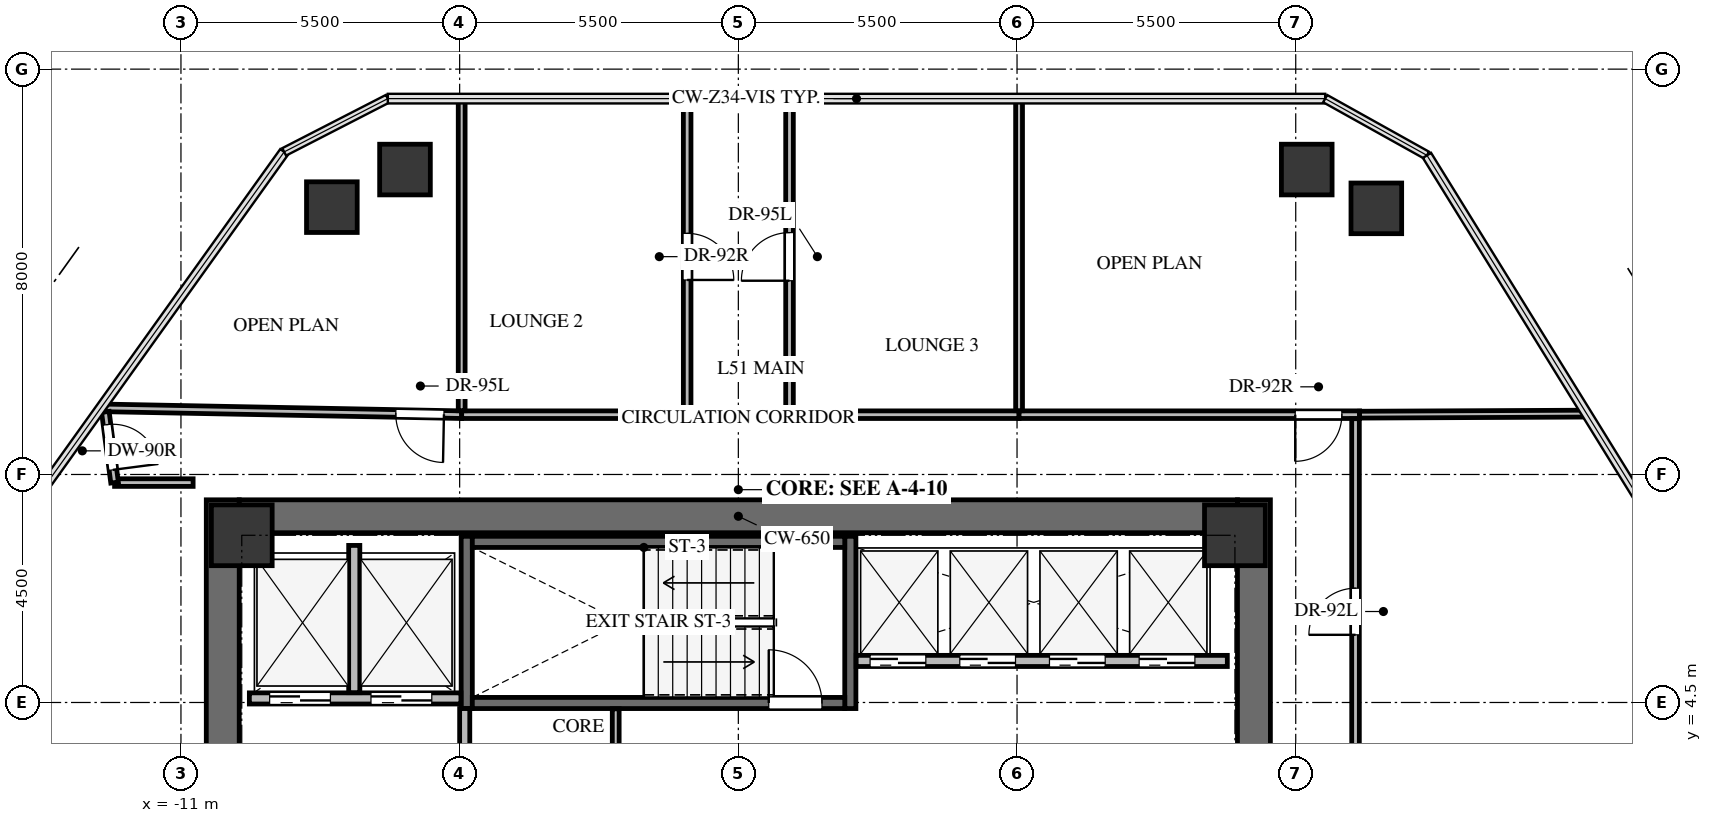
"""IFC4 building model, lengths in metres.
Left out: names, types, materials, properties, quantities, classifications, styles, units other than length and angle.
Written with IfcOpenShell. Run it as: python <this file> out.ifc"""

import sys

from ifc_helpers import new_model, si_unit, direction, frame, frame_2d, origin, origin_2d, place, context, subcontext, project, spatial, rectangle, extrude, source, transform, mapped, element, fill, save


model = new_model("IFC4")
c1 = context("Model", 3, precision=1e-05, world=origin(), true_north=direction((0.0, 1.0)))
c2 = subcontext(c1, "Body", "Model", "MODEL_VIEW")
j1 = project(units=[si_unit("LENGTHUNIT", "METRE"), si_unit("PLANEANGLEUNIT", "RADIAN")], contexts=[c1])
p1 = place(None, origin())
s1 = spatial("IfcSite", under=j1, at=p1, CompositionType="ELEMENT")
p2 = place(p1, origin())
s2 = spatial("IfcBuilding", under=s1, at=p2, CompositionType="ELEMENT")
p3 = place(p2, frame((0.0, 0.0, 187.0)))
s3 = spatial("IfcBuildingStorey", under=s2, at=p3, CompositionType="ELEMENT", Elevation=187.0)
for number, where, z_axis, x_axis in (
    (1, (-10.175, -8.5, 0.0), (0.0, 0.0, 1.0), (0.0, 1.0, 0.0)),
    (2, (10.175, -8.5, 0.0), (0.0, 0.0, 1.0), (0.0, 1.0, 0.0)),
):
    element("IfcWall", number, at=place(p3, frame(where, z_axis=z_axis, x_axis=x_axis)), inside=s3, PredefinedType="SHEAR", context=c2, shape_type="SweptSolid", body=[
        extrude(rectangle(XDim=17.0, YDim=0.65, at=frame_2d((8.5, 0.0))), origin(), (0.0, 0.0, 1.0), 3.3),
    ])
p4 = place(p3, frame((-9.85, 8.175, 0.0), z_axis=(0.0, 0.0, 1.0), x_axis=(1.0, 0.0, 0.0)))
e3 = element("IfcWall", 3, at=p4, inside=s3, PredefinedType="SHEAR", context=c2, shape_type="SweptSolid", body=[
    extrude(rectangle(XDim=19.7, YDim=0.65, at=frame_2d((9.85, 0.0))), origin(), (0.0, 0.0, 1.0), 3.3),
])
for number, where, z_axis, x_axis in (
    (4, (2.21, 4.38, -0.24), (0.0, 0.0, 1.0), (0.0, 1.0, 0.0)),
    (5, (-5.36, 7.78, -0.24), (0.0, 0.0, 1.0), (0.0, -1.0, 0.0)),
):
    element("IfcWall", number, at=place(p3, frame(where, z_axis=z_axis, x_axis=x_axis)), inside=s3, PredefinedType="SHEAR", context=c2, shape_type="SweptSolid", body=[
        extrude(rectangle(XDim=3.4, YDim=0.22, at=frame_2d((1.7, 0.0))), origin(), (0.0, 0.0, 1.0), 3.3),
    ])
p5 = place(p3, frame((-5.25, 4.49, -0.24), z_axis=(0.0, 0.0, 1.0), x_axis=(1.0, 0.0, 0.0)))
e6 = element("IfcWall", 6, at=p5, inside=s3, PredefinedType="SHEAR", context=c2, shape_type="SweptSolid", body=[
    extrude(rectangle(XDim=7.35, YDim=0.22, at=frame_2d((3.675, 0.0))), origin(), (0.0, 0.0, 1.0), 3.3),
])
p6 = place(p5, frame((5.85, 0.0, 0.0)))
e7 = element("IfcOpeningElement", 7, at=p6, cuts=e6, PredefinedType="OPENING", context=c2, shape_type="SweptSolid", body=[
    extrude(rectangle(XDim=1.05, YDim=2.15, at=frame_2d((0.525, 1.075))), frame((0.0, 0.12, 0.0), z_axis=(0.0, -1.0, 0.0), x_axis=(1.0, 0.0, 0.0)), (0.0, 0.0, 1.0), 0.24),
])
p7 = place(p3, frame((2.1, 7.67, -0.24), z_axis=(0.0, 0.0, 1.0), x_axis=(-1.0, 0.0, 0.0)))
e8 = element("IfcWall", 8, at=p7, inside=s3, PredefinedType="SHEAR", context=c2, shape_type="SweptSolid", body=[
    extrude(rectangle(XDim=7.35, YDim=0.22, at=frame_2d((3.675, 0.0))), origin(), (0.0, 0.0, 1.0), 3.3),
])
m1 = source(origin(), c2, "Body", "SweptSolid", [
    extrude(rectangle(XDim=1.2, YDim=1.2, at=origin_2d()), origin(), (0.0, 0.0, 1.0), 3.3),
])
for number, where, z_axis, x_axis in (
    (9, (9.8, 7.8, -0.24), (0.0, 0.0, 1.0), (1.0, 0.0, 0.0)),
    (10, (-9.8, 7.8, -0.24), (0.0, 0.0, 1.0), (1.0, 0.0, 0.0)),
):
    element("IfcColumn", number, at=place(p3, frame(where, z_axis=z_axis, x_axis=x_axis)), inside=s3, PredefinedType="COLUMN", context=c2, shape_type="MappedRepresentation", body=[
        mapped(m1, transform((0.0, 0.0, 0.0), x_axis=(1.0, 0.0, 0.0), y_axis=(0.0, 1.0, 0.0), z_axis=(0.0, 0.0, 1.0), scale=1.0)),
    ])
m2 = source(origin(), c2, "Body", "SweptSolid", [
    extrude(rectangle(XDim=1.0, YDim=1.0, at=origin_2d()), origin(), (0.0, 0.0, 1.0), 3.3),
])
for number, where, z_axis, x_axis in (
    (11, (-8.022, 14.276, -0.24), (0.0, 0.0, 1.0), (1.0, 0.0, 0.0)),
    (12, (-6.579, 15.018, -0.24), (0.0, 0.0, 1.0), (1.0, 0.0, 0.0)),
    (13, (11.218, 15.018, -0.24), (0.0, 0.0, 1.0), (1.0, 0.0, 0.0)),
    (14, (12.591, 14.252, -0.24), (0.0, 0.0, 1.0), (1.0, 0.0, 0.0)),
):
    element("IfcColumn", number, at=place(p3, frame(where, z_axis=z_axis, x_axis=x_axis)), inside=s3, PredefinedType="COLUMN", context=c2, shape_type="MappedRepresentation", body=[
        mapped(m2, transform((0.0, 0.0, 0.0), x_axis=(1.0, 0.0, 0.0), y_axis=(0.0, 1.0, 0.0), z_axis=(0.0, 0.0, 1.0), scale=1.0)),
    ])
p8 = place(p3, frame((-9.65, 4.58, 0.0), z_axis=(0.0, 0.0, 1.0), x_axis=(1.0, 0.0, 0.0)))
e15 = element("IfcWall", 15, at=p8, inside=s3, PredefinedType="SOLIDWALL", context=c2, shape_type="SweptSolid", body=[
    extrude(rectangle(XDim=4.175, YDim=0.22, at=frame_2d((2.087, 0.0))), origin(), (0.0, 0.0, 1.0), 3.045),
])
p9 = place(p8, frame((0.4, 0.0, 0.0)))
e16 = element("IfcOpeningElement", 16, at=p9, cuts=e15, PredefinedType="OPENING", context=c2, shape_type="SweptSolid", body=[
    extrude(rectangle(XDim=1.2, YDim=2.15, at=frame_2d((0.6, 1.075))), frame((0.0, 0.12, 0.0), z_axis=(0.0, -1.0, 0.0), x_axis=(1.0, 0.0, 0.0)), (0.0, 0.0, 1.0), 0.24),
])
p10 = place(p8, frame((2.4, 0.0, 0.0)))
e17 = element("IfcOpeningElement", 17, at=p10, cuts=e15, PredefinedType="OPENING", context=c2, shape_type="SweptSolid", body=[
    extrude(rectangle(XDim=1.2, YDim=2.15, at=frame_2d((0.6, 1.075))), frame((0.0, 0.12, 0.0), z_axis=(0.0, -1.0, 0.0), x_axis=(1.0, 0.0, 0.0)), (0.0, 0.0, 1.0), 0.24),
])
p11 = place(p3, frame((-7.58, 4.694, 0.0), z_axis=(0.0, 0.0, 1.0), x_axis=(0.0, 1.0, 0.0)))
e18 = element("IfcWall", 18, at=p11, inside=s3, PredefinedType="SOLIDWALL", context=c2, shape_type="SweptSolid", body=[
    extrude(rectangle(XDim=2.906, YDim=0.22, at=frame_2d((1.453, 0.0))), origin(), (0.0, 0.0, 1.0), 3.045),
])
p12 = place(p3, frame((-5.4, 0.354, 0.0), z_axis=(0.0, 0.0, 1.0), x_axis=(0.0, 1.0, 0.0)))
e19 = element("IfcWall", 19, at=p12, inside=s3, PredefinedType="SOLIDWALL", context=c2, shape_type="SweptSolid", body=[
    extrude(rectangle(XDim=4.026, YDim=0.2, at=frame_2d((2.013, 0.0))), origin(), (0.0, 0.0, 1.0), 3.045),
])
p13 = place(p12, frame((0.246, 0.0, 0.0)))
e20 = element("IfcOpeningElement", 20, at=p13, cuts=e19, PredefinedType="OPENING", context=c2, shape_type="SweptSolid", body=[
    extrude(rectangle(XDim=1.0, YDim=2.15, at=frame_2d((0.5, 1.075))), frame((0.0, 0.11, 0.0), z_axis=(0.0, -1.0, 0.0), x_axis=(1.0, 0.0, 0.0)), (0.0, 0.0, 1.0), 0.22),
])
p14 = place(p3, frame((2.325, 5.32, 0.0), z_axis=(0.0, 0.0, 1.0), x_axis=(1.0, 0.0, 0.0)))
e21 = element("IfcWall", 21, at=p14, inside=s3, PredefinedType="SOLIDWALL", context=c2, shape_type="SweptSolid", body=[
    extrude(rectangle(XDim=7.325, YDim=0.22, at=frame_2d((3.663, 0.0))), origin(), (0.0, 0.0, 1.0), 3.045),
])
p15 = place(p14, frame((0.275, 0.0, 0.0)))
e22 = element("IfcOpeningElement", 22, at=p15, cuts=e21, PredefinedType="OPENING", context=c2, shape_type="SweptSolid", body=[
    extrude(rectangle(XDim=1.1, YDim=2.15, at=frame_2d((0.55, 1.075))), frame((0.0, 0.12, 0.0), z_axis=(0.0, -1.0, 0.0), x_axis=(1.0, 0.0, 0.0)), (0.0, 0.0, 1.0), 0.24),
])
p16 = place(p14, frame((2.045, 0.0, 0.0)))
e23 = element("IfcOpeningElement", 23, at=p16, cuts=e21, PredefinedType="OPENING", context=c2, shape_type="SweptSolid", body=[
    extrude(rectangle(XDim=1.1, YDim=2.15, at=frame_2d((0.55, 1.075))), frame((0.0, 0.12, 0.0), z_axis=(0.0, -1.0, 0.0), x_axis=(1.0, 0.0, 0.0)), (0.0, 0.0, 1.0), 0.24),
])
p17 = place(p14, frame((3.815, 0.0, 0.0)))
e24 = element("IfcOpeningElement", 24, at=p17, cuts=e21, PredefinedType="OPENING", context=c2, shape_type="SweptSolid", body=[
    extrude(rectangle(XDim=1.1, YDim=2.15, at=frame_2d((0.55, 1.075))), frame((0.0, 0.12, 0.0), z_axis=(0.0, -1.0, 0.0), x_axis=(1.0, 0.0, 0.0)), (0.0, 0.0, 1.0), 0.24),
])
p18 = place(p14, frame((5.585, 0.0, 0.0)))
e25 = element("IfcOpeningElement", 25, at=p18, cuts=e21, PredefinedType="OPENING", context=c2, shape_type="SweptSolid", body=[
    extrude(rectangle(XDim=1.1, YDim=2.15, at=frame_2d((0.55, 1.075))), frame((0.0, 0.12, 0.0), z_axis=(0.0, -1.0, 0.0), x_axis=(1.0, 0.0, 0.0)), (0.0, 0.0, 1.0), 0.24),
])
p19 = place(p3, frame((-5.46, 10.18, 0.0), z_axis=(0.0, 0.0, 1.0), x_axis=(-0.99981828266, 0.019063096779, 0.0)))
e26 = element("IfcWall", 26, at=p19, inside=s3, PredefinedType="PARTITIONING", context=c2, shape_type="SweptSolid", body=[
    extrude(rectangle(XDim=7.121, YDim=0.15, at=frame_2d((3.56, 0.0))), origin(), (0.0, 0.0, 1.0), 2.242),
])
p20 = place(p19, frame((0.35, 0.0, 0.0)))
e27 = element("IfcOpeningElement", 27, at=p20, cuts=e26, PredefinedType="OPENING", context=c2, shape_type="SweptSolid", body=[
    extrude(rectangle(XDim=0.95, YDim=2.1, at=frame_2d((0.475, 1.05))), frame((0.0, 0.085, 0.0), z_axis=(0.0, -1.0, 0.0), x_axis=(1.0, 0.0, 0.0)), (0.0, 0.0, 1.0), 0.17),
])
p21 = place(p3, frame((-1.01, 16.418, 0.0), z_axis=(0.0, 0.0, 1.0), x_axis=(0.0, -1.0, 0.0)))
e28 = element("IfcWall", 28, at=p21, inside=s3, PredefinedType="PARTITIONING", context=c2, shape_type="SweptSolid", body=[
    extrude(rectangle(XDim=6.238, YDim=0.15, at=frame_2d((3.119, 0.0))), origin(), (0.0, 0.0, 1.0), 2.399),
])
p22 = place(p21, frame((2.659, 0.0, 0.0)))
e29 = element("IfcOpeningElement", 29, at=p22, cuts=e28, PredefinedType="OPENING", context=c2, shape_type="SweptSolid", body=[
    extrude(rectangle(XDim=0.92, YDim=2.1, at=frame_2d((0.46, 1.05))), frame((0.0, 0.085, 0.0), z_axis=(0.0, -1.0, 0.0), x_axis=(1.0, 0.0, 0.0)), (0.0, 0.0, 1.0), 0.17),
])
p23 = place(p3, frame((-1.089, 10.18, 0.0), z_axis=(0.0, 0.0, 1.0), x_axis=(-1.0, 0.0, 0.0)))
e30 = element("IfcWall", 30, at=p23, inside=s3, PredefinedType="PARTITIONING", context=c2, shape_type="SweptSolid", body=[
    extrude(rectangle(XDim=4.371, YDim=0.15, at=frame_2d((2.186, 0.0))), origin(), (0.0, 0.0, 1.0), 2.608),
])
p24 = place(p3, frame((1.01, 10.18, 0.0), z_axis=(0.0, 0.0, 1.0), x_axis=(0.0, 1.0, 0.0)))
e31 = element("IfcWall", 31, at=p24, inside=s3, PredefinedType="PARTITIONING", context=c2, shape_type="SweptSolid", body=[
    extrude(rectangle(XDim=6.238, YDim=0.15, at=frame_2d((3.119, 0.0))), origin(), (0.0, 0.0, 1.0), 2.399),
])
p25 = place(p24, frame((2.644, 0.0, 0.0)))
e32 = element("IfcOpeningElement", 32, at=p25, cuts=e31, PredefinedType="OPENING", context=c2, shape_type="SweptSolid", body=[
    extrude(rectangle(XDim=0.95, YDim=2.1, at=frame_2d((0.475, 1.05))), frame((0.0, 0.085, 0.0), z_axis=(0.0, -1.0, 0.0), x_axis=(1.0, 0.0, 0.0)), (0.0, 0.0, 1.0), 0.17),
])
p26 = place(p3, frame((5.54, 10.18, 0.0), z_axis=(0.0, 0.0, 1.0), x_axis=(-1.0, 0.0, 0.0)))
e33 = element("IfcWall", 33, at=p26, inside=s3, PredefinedType="PARTITIONING", context=c2, shape_type="SweptSolid", body=[
    extrude(rectangle(XDim=4.451, YDim=0.15, at=frame_2d((2.226, 0.0))), origin(), (0.0, 0.0, 1.0), 2.608),
])
p27 = place(p3, frame((12.26, 10.18, 0.0), z_axis=(0.0, 0.0, 1.0), x_axis=(-1.0, 0.0, 0.0)))
e34 = element("IfcWall", 34, at=p27, inside=s3, PredefinedType="PARTITIONING", context=c2, shape_type="SweptSolid", body=[
    extrude(rectangle(XDim=6.72, YDim=0.15, at=frame_2d((3.36, 0.0))), origin(), (0.0, 0.0, 1.0), 2.242),
])
p28 = place(p27, frame((0.35, 0.0, 0.0)))
e35 = element("IfcOpeningElement", 35, at=p28, cuts=e34, PredefinedType="OPENING", context=c2, shape_type="SweptSolid", body=[
    extrude(rectangle(XDim=0.92, YDim=2.1, at=frame_2d((0.46, 1.05))), frame((0.0, 0.085, 0.0), z_axis=(0.0, -1.0, 0.0), x_axis=(1.0, 0.0, 0.0)), (0.0, 0.0, 1.0), 0.17),
])
p29 = place(p3, frame((-12.31, 8.84, 0.0), z_axis=(0.0, 0.0, 1.0), x_axis=(1.0, 0.0, 0.0)))
e36 = element("IfcWall", 36, at=p29, inside=s3, PredefinedType="PARTITIONING", context=c2, shape_type="SweptSolid", body=[
    extrude(rectangle(XDim=1.55, YDim=0.15, at=frame_2d((0.775, 0.0))), origin(), (0.0, 0.0, 1.0), 2.399),
])
p30 = place(p3, frame((-12.492, 10.235, 0.0), z_axis=(0.0, 0.0, 1.0), x_axis=(0.129309502928, -0.991604282187, 0.0)))
e37 = element("IfcWall", 37, at=p30, inside=s3, PredefinedType="PARTITIONING", context=c2, shape_type="SweptSolid", body=[
    extrude(rectangle(XDim=1.406, YDim=0.15, at=frame_2d((0.703, 0.0))), origin(), (0.0, 0.0, 1.0), 3.045),
])
p31 = place(p30, frame((0.253, 0.0, 0.0)))
e38 = element("IfcOpeningElement", 38, at=p31, cuts=e37, PredefinedType="OPENING", context=c2, shape_type="SweptSolid", body=[
    extrude(rectangle(XDim=0.9, YDim=2.05, at=frame_2d((0.45, 1.025))), frame((0.0, 0.085, 0.0), z_axis=(0.0, -1.0, 0.0), x_axis=(1.0, 0.0, 0.0)), (0.0, 0.0, 1.0), 0.17),
])
p32 = place(p3, frame((12.18, 2.49, 0.0), z_axis=(0.0, 0.0, 1.0), x_axis=(0.0, 1.0, 0.0)))
e39 = element("IfcWall", 39, at=p32, inside=s3, PredefinedType="PARTITIONING", context=c2, shape_type="SweptSolid", body=[
    extrude(rectangle(XDim=7.611, YDim=0.15, at=frame_2d((3.806, 0.0))), origin(), (0.0, 0.0, 1.0), 3.045),
])
p33 = place(p32, frame((3.345, 0.0, 0.0)))
e40 = element("IfcOpeningElement", 40, at=p33, cuts=e39, PredefinedType="OPENING", context=c2, shape_type="SweptSolid", body=[
    extrude(rectangle(XDim=0.92, YDim=2.1, at=frame_2d((0.46, 1.05))), frame((0.0, 0.085, 0.0), z_axis=(0.0, -1.0, 0.0), x_axis=(1.0, 0.0, 0.0)), (0.0, 0.0, 1.0), 0.17),
])
p34 = place(p3, frame((-2.42, 4.375, 0.0), z_axis=(0.0, 0.0, 1.0), x_axis=(0.0, -1.0, 0.0)))
e41 = element("IfcWall", 41, at=p34, inside=s3, PredefinedType="PARTITIONING", context=c2, shape_type="SweptSolid", body=[
    extrude(rectangle(XDim=2.586, YDim=0.135, at=frame_2d((1.293, 0.0))), origin(), (0.0, 0.0, 1.0), 3.045),
])
for number, where, z_axis, x_axis in (
    (42, (-5.46, 16.418, 0.0), (0.0, 0.0, 1.0), (0.0, -1.0, 0.0)),
    (43, (5.54, 16.418, 0.0), (0.0, 0.0, 1.0), (0.0, -1.0, 0.0)),
):
    element("IfcWall", number, at=place(p3, frame(where, z_axis=z_axis, x_axis=x_axis)), inside=s3, PredefinedType="PARTITIONING", context=c2, shape_type="SweptSolid", body=[
        extrude(rectangle(XDim=6.159, YDim=0.135, at=frame_2d((3.08, 0.0))), origin(), (0.0, 0.0, 1.0), 2.399),
    ])
p35 = place(p3, frame((16.74, 10.201, 0.0), z_axis=(0.0, 0.0, 1.0), x_axis=(-0.999989522694, -0.004577608714, 0.0)))
e44 = element("IfcWall", 44, at=p35, inside=s3, PredefinedType="PARTITIONING", context=c2, shape_type="SweptSolid", body=[
    extrude(rectangle(XDim=4.48, YDim=0.135, at=frame_2d((2.24, 0.0))), origin(), (0.0, 0.0, 1.0), 2.399),
])
m3 = source(origin(), c2, "Body", "SweptSolid", [
    extrude(rectangle(XDim=1.05, YDim=2.15, at=frame_2d((0.525, 1.075))), frame((0.0, 0.025, 0.0), z_axis=(0.0, -1.0, 0.0), x_axis=(1.0, 0.0, 0.0)), (0.0, 0.0, 1.0), 0.05),
])
p36 = place(p6, origin())
e45 = element("IfcDoor", 45, at=p36, inside=s3, OperationType="SINGLE_SWING_LEFT", PredefinedType="DOOR", context=c2, shape_type="MappedRepresentation", body=[
    mapped(m3, transform((0.0, 0.0, 0.0), x_axis=(1.0, 0.0, 0.0), y_axis=(0.0, 1.0, 0.0), z_axis=(0.0, 0.0, 1.0), scale=1.0)),
])
fill(e7, e45)
m4 = source(origin(), c2, "Body", "SweptSolid", [
    extrude(rectangle(XDim=1.2, YDim=2.15, at=frame_2d((0.6, 1.075))), frame((0.0, 0.025, 0.0), z_axis=(0.0, -1.0, 0.0), x_axis=(1.0, 0.0, 0.0)), (0.0, 0.0, 1.0), 0.05),
])
p37 = place(p9, origin())
e46 = element("IfcDoor", 46, at=p37, inside=s3, OperationType="DOUBLE_DOOR_SLIDING", PredefinedType="DOOR", context=c2, shape_type="MappedRepresentation", body=[
    mapped(m4, transform((0.0, 0.0, 0.0), x_axis=(1.0, 0.0, 0.0), y_axis=(0.0, 1.0, 0.0), z_axis=(0.0, 0.0, 1.0), scale=1.0)),
])
fill(e16, e46)
p38 = place(p10, origin())
e47 = element("IfcDoor", 47, at=p38, inside=s3, OperationType="DOUBLE_DOOR_SLIDING", PredefinedType="DOOR", context=c2, shape_type="MappedRepresentation", body=[
    mapped(m4, transform((0.0, 0.0, 0.0), x_axis=(1.0, 0.0, 0.0), y_axis=(0.0, 1.0, 0.0), z_axis=(0.0, 0.0, 1.0), scale=1.0)),
])
fill(e17, e47)
m5 = source(origin(), c2, "Body", "SweptSolid", [
    extrude(rectangle(XDim=1.1, YDim=2.15, at=frame_2d((0.55, 1.075))), frame((0.0, 0.025, 0.0), z_axis=(0.0, -1.0, 0.0), x_axis=(1.0, 0.0, 0.0)), (0.0, 0.0, 1.0), 0.05),
])
p39 = place(p15, origin())
e48 = element("IfcDoor", 48, at=p39, inside=s3, OperationType="DOUBLE_DOOR_SLIDING", PredefinedType="DOOR", context=c2, shape_type="MappedRepresentation", body=[
    mapped(m5, transform((0.0, 0.0, 0.0), x_axis=(1.0, 0.0, 0.0), y_axis=(0.0, 1.0, 0.0), z_axis=(0.0, 0.0, 1.0), scale=1.0)),
])
fill(e22, e48)
p40 = place(p16, origin())
e49 = element("IfcDoor", 49, at=p40, inside=s3, OperationType="DOUBLE_DOOR_SLIDING", PredefinedType="DOOR", context=c2, shape_type="MappedRepresentation", body=[
    mapped(m5, transform((0.0, 0.0, 0.0), x_axis=(1.0, 0.0, 0.0), y_axis=(0.0, 1.0, 0.0), z_axis=(0.0, 0.0, 1.0), scale=1.0)),
])
fill(e23, e49)
p41 = place(p17, origin())
e50 = element("IfcDoor", 50, at=p41, inside=s3, OperationType="DOUBLE_DOOR_SLIDING", PredefinedType="DOOR", context=c2, shape_type="MappedRepresentation", body=[
    mapped(m5, transform((0.0, 0.0, 0.0), x_axis=(1.0, 0.0, 0.0), y_axis=(0.0, 1.0, 0.0), z_axis=(0.0, 0.0, 1.0), scale=1.0)),
])
fill(e24, e50)
p42 = place(p18, origin())
e51 = element("IfcDoor", 51, at=p42, inside=s3, OperationType="DOUBLE_DOOR_SLIDING", PredefinedType="DOOR", context=c2, shape_type="MappedRepresentation", body=[
    mapped(m5, transform((0.0, 0.0, 0.0), x_axis=(1.0, 0.0, 0.0), y_axis=(0.0, 1.0, 0.0), z_axis=(0.0, 0.0, 1.0), scale=1.0)),
])
fill(e25, e51)
m6 = source(origin(), c2, "Body", "SweptSolid", [
    extrude(rectangle(XDim=0.95, YDim=2.1, at=frame_2d((0.475, 1.05))), frame((0.0, 0.025, 0.0), z_axis=(0.0, -1.0, 0.0), x_axis=(1.0, 0.0, 0.0)), (0.0, 0.0, 1.0), 0.05),
])
p43 = place(p20, origin())
e52 = element("IfcDoor", 52, at=p43, inside=s3, OperationType="SINGLE_SWING_LEFT", PredefinedType="DOOR", context=c2, shape_type="MappedRepresentation", body=[
    mapped(m6, transform((0.0, 0.0, 0.0), x_axis=(1.0, 0.0, 0.0), y_axis=(0.0, 1.0, 0.0), z_axis=(0.0, 0.0, 1.0), scale=1.0)),
])
fill(e27, e52)
m7 = source(origin(), c2, "Body", "SweptSolid", [
    extrude(rectangle(XDim=0.92, YDim=2.1, at=frame_2d((0.46, 1.05))), frame((0.0, 0.025, 0.0), z_axis=(0.0, -1.0, 0.0), x_axis=(1.0, 0.0, 0.0)), (0.0, 0.0, 1.0), 0.05),
])
p44 = place(p22, origin())
e53 = element("IfcDoor", 53, at=p44, inside=s3, OperationType="SINGLE_SWING_RIGHT", PredefinedType="DOOR", context=c2, shape_type="MappedRepresentation", body=[
    mapped(m7, transform((0.0, 0.0, 0.0), x_axis=(1.0, 0.0, 0.0), y_axis=(0.0, 1.0, 0.0), z_axis=(0.0, 0.0, 1.0), scale=1.0)),
])
fill(e29, e53)
p45 = place(p25, origin())
e54 = element("IfcDoor", 54, at=p45, inside=s3, OperationType="SINGLE_SWING_LEFT", PredefinedType="DOOR", context=c2, shape_type="MappedRepresentation", body=[
    mapped(m6, transform((0.0, 0.0, 0.0), x_axis=(1.0, 0.0, 0.0), y_axis=(0.0, 1.0, 0.0), z_axis=(0.0, 0.0, 1.0), scale=1.0)),
])
fill(e32, e54)
p46 = place(p28, origin())
e55 = element("IfcDoor", 55, at=p46, inside=s3, OperationType="SINGLE_SWING_RIGHT", PredefinedType="DOOR", context=c2, shape_type="MappedRepresentation", body=[
    mapped(m7, transform((0.0, 0.0, 0.0), x_axis=(1.0, 0.0, 0.0), y_axis=(0.0, 1.0, 0.0), z_axis=(0.0, 0.0, 1.0), scale=1.0)),
])
fill(e35, e55)
m8 = source(origin(), c2, "Body", "SweptSolid", [
    extrude(rectangle(XDim=0.9, YDim=2.05, at=frame_2d((0.45, 1.025))), frame((0.0, 0.025, 0.0), z_axis=(0.0, -1.0, 0.0), x_axis=(1.0, 0.0, 0.0)), (0.0, 0.0, 1.0), 0.05),
])
p47 = place(p31, origin())
e56 = element("IfcDoor", 56, at=p47, inside=s3, OperationType="SINGLE_SWING_RIGHT", PredefinedType="DOOR", context=c2, shape_type="MappedRepresentation", body=[
    mapped(m8, transform((0.0, 0.0, 0.0), x_axis=(1.0, 0.0, 0.0), y_axis=(0.0, 1.0, 0.0), z_axis=(0.0, 0.0, 1.0), scale=1.0)),
])
fill(e38, e56)
m9 = source(origin(), c2, "Body", "SweptSolid", [
    extrude(rectangle(XDim=0.92, YDim=2.1, at=frame_2d((0.46, 1.05))), frame((0.0, 0.025, 0.0), z_axis=(0.0, -1.0, 0.0), x_axis=(1.0, 0.0, 0.0)), (0.0, 0.0, 1.0), 0.05),
])
p48 = place(p33, origin())
e57 = element("IfcDoor", 57, at=p48, inside=s3, OperationType="SINGLE_SWING_LEFT", PredefinedType="DOOR", context=c2, shape_type="MappedRepresentation", body=[
    mapped(m9, transform((0.0, 0.0, 0.0), x_axis=(1.0, 0.0, 0.0), y_axis=(0.0, 1.0, 0.0), z_axis=(0.0, 0.0, 1.0), scale=1.0)),
])
fill(e40, e57)
save(model, sys.argv[1])
